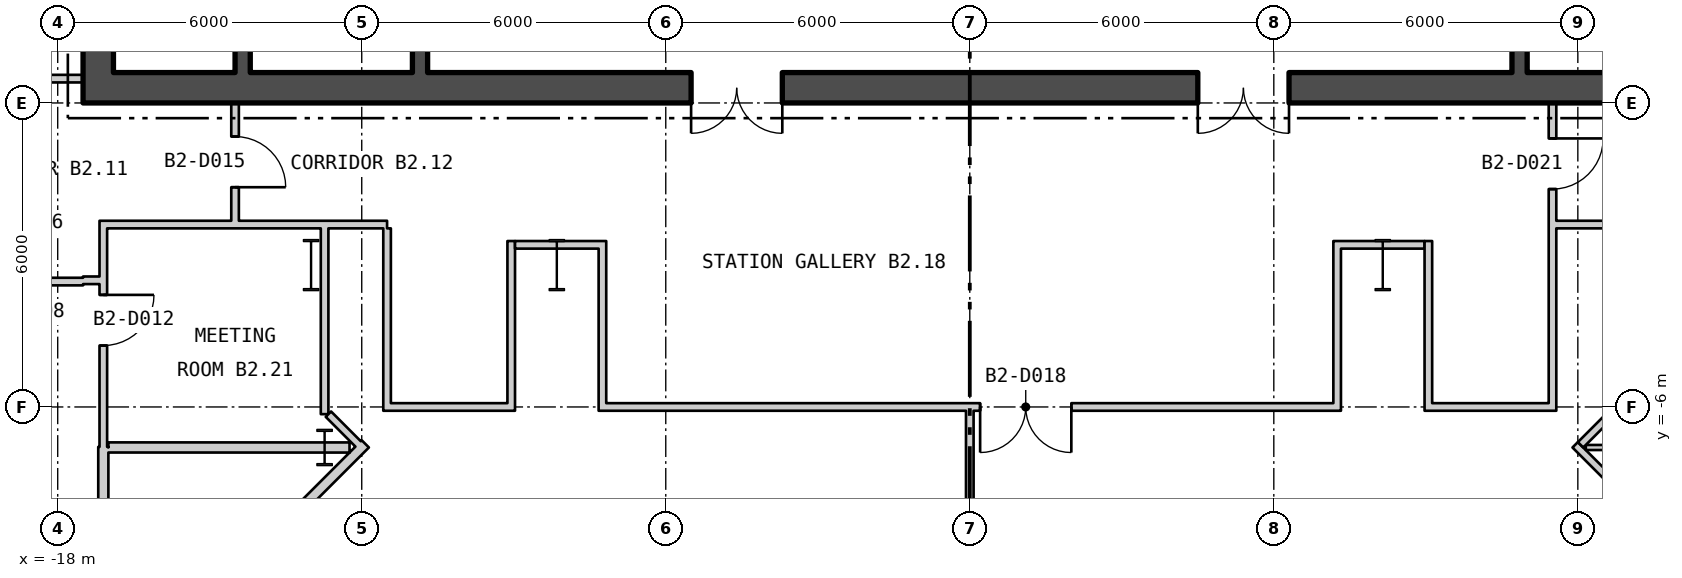
"""IFC4 building model, lengths in metres.
Left out: names, types, materials, properties, quantities, classifications, styles, units other than length and angle.
Written with IfcOpenShell. Run it as: python <this file> out.ifc"""

import sys

from ifc_helpers import new_model, si_unit, direction, frame, frame_2d, origin, origin_2d, place, context, subcontext, project, spatial, rectangle, i_section, extrude, element, fill, save


model = new_model("IFC4")
c1 = context("Model", 3, precision=1e-05, world=origin(), true_north=direction((0.0, 1.0)))
c2 = subcontext(c1, "Body", "Model", "MODEL_VIEW")
j1 = project(units=[si_unit("LENGTHUNIT", "METRE"), si_unit("PLANEANGLEUNIT", "RADIAN")], contexts=[c1])
p1 = place(None, origin())
s1 = spatial("IfcSite", under=j1, at=p1, CompositionType="ELEMENT")
p2 = place(p1, origin())
s2 = spatial("IfcBuilding", under=s1, at=p2, CompositionType="ELEMENT")
p3 = place(p2, frame((0.0, 0.0, -11.4)))
s3 = spatial("IfcBuildingStorey", under=s2, at=p3, CompositionType="ELEMENT", Elevation=-11.4)
for number, where, z_axis, x_axis in (
    (1, (8.15, -3.2, 0.0), (0.0, 0.0, 1.0), (1.0, 0.0, 0.0)),
    (2, (-8.15, -3.2, 0.0), (0.0, 0.0, 1.0), (1.0, 0.0, 0.0)),
    (3, (-13.0, -3.2, 0.0), (0.0, 0.0, 1.0), (1.0, 0.0, 0.0)),
):
    element("IfcColumn", number, at=place(p3, frame(where, z_axis=z_axis, x_axis=x_axis)), inside=s3, PredefinedType="COLUMN", context=c2, shape_type="SweptSolid", body=[
        extrude(i_section(OverallWidth=0.302, OverallDepth=1.008, WebThickness=0.021, FlangeThickness=0.04, at=origin_2d()), origin(), (0.0, 0.0, 1.0), 5.7),
    ])
p4 = place(p3, frame((-12.733, -6.8, 0.0), z_axis=(0.0, 0.0, 1.0), x_axis=(1.0, 0.0, 0.0)))
e4 = element("IfcColumn", 4, at=p4, inside=s3, PredefinedType="COLUMN", context=c2, shape_type="SweptSolid", body=[
    extrude(i_section(OverallWidth=0.304, OverallDepth=0.716, WebThickness=0.021, FlangeThickness=0.04, at=origin_2d()), origin(), (0.0, 0.0, 1.0), 5.7),
])
p5 = place(p3, frame((-17.5, 0.3, 0.0), z_axis=(0.0, 0.0, 1.0), x_axis=(1.0, 0.0, 0.0)))
e5 = element("IfcWall", 5, at=p5, inside=s3, PredefinedType="SHEAR", context=c2, shape_type="SweptSolid", body=[
    extrude(rectangle(XDim=35.0, YDim=0.6, at=frame_2d((17.5, 0.0))), origin(), (0.0, 0.0, 1.0), 5.25),
])
p6 = place(p5, frame((12.0, 0.0, 0.0)))
e6 = element("IfcOpeningElement", 6, at=p6, cuts=e5, PredefinedType="OPENING", context=c2, shape_type="SweptSolid", body=[
    extrude(rectangle(XDim=1.8, YDim=2.4, at=frame_2d((0.9, 1.2))), frame((0.0, 0.31, 0.0), z_axis=(0.0, -1.0, 0.0), x_axis=(1.0, 0.0, 0.0)), (0.0, 0.0, 1.0), 0.62),
])
p7 = place(p5, frame((22.0, 0.0, 0.0)))
e7 = element("IfcOpeningElement", 7, at=p7, cuts=e5, PredefinedType="OPENING", context=c2, shape_type="SweptSolid", body=[
    extrude(rectangle(XDim=1.8, YDim=2.4, at=frame_2d((0.9, 1.2))), frame((0.0, 0.31, 0.0), z_axis=(0.0, -1.0, 0.0), x_axis=(1.0, 0.0, 0.0)), (0.0, 0.0, 1.0), 0.62),
])
p8 = place(p3, frame((-17.2, 0.6, 0.0), z_axis=(0.0, 0.0, 1.0), x_axis=(0.0, 1.0, 0.0)))
e8 = element("IfcWall", 8, at=p8, inside=s3, PredefinedType="SHEAR", context=c2, shape_type="SweptSolid", body=[
    extrude(rectangle(XDim=16.8, YDim=0.6, at=frame_2d((8.4, 0.0))), origin(), (0.0, 0.0, 1.0), 5.25),
])
p9 = place(p8, frame((5.7, 0.0, 0.0)))
e9 = element("IfcOpeningElement", 9, at=p9, cuts=e8, PredefinedType="OPENING", context=c2, shape_type="SweptSolid", body=[
    extrude(rectangle(XDim=1.5, YDim=2.1, at=frame_2d((0.75, 1.05))), frame((0.0, 0.31, 0.0), z_axis=(0.0, -1.0, 0.0), x_axis=(1.0, 0.0, 0.0)), (0.0, 0.0, 1.0), 0.62),
])
p10 = place(p8, frame((1.5, 0.0, 0.0)))
e10 = element("IfcOpeningElement", 10, at=p10, cuts=e8, PredefinedType="OPENING", context=c2, shape_type="SweptSolid", body=[
    extrude(rectangle(XDim=0.9, YDim=2.1, at=frame_2d((0.45, 1.05))), frame((0.0, 0.31, 0.0), z_axis=(0.0, -1.0, 0.0), x_axis=(1.0, 0.0, 0.0)), (0.0, 0.0, 1.0), 0.62),
])
p11 = place(p8, frame((4.35, 0.0, 0.0)))
e11 = element("IfcOpeningElement", 11, at=p11, cuts=e8, PredefinedType="OPENING", context=c2, shape_type="SweptSolid", body=[
    extrude(rectangle(XDim=0.9, YDim=2.1, at=frame_2d((0.45, 1.05))), frame((0.0, 0.31, 0.0), z_axis=(0.0, -1.0, 0.0), x_axis=(1.0, 0.0, 0.0)), (0.0, 0.0, 1.0), 0.62),
])
p12 = place(p8, frame((8.423, 0.0, 0.0)))
e12 = element("IfcOpeningElement", 12, at=p12, cuts=e8, PredefinedType="OPENING", context=c2, shape_type="SweptSolid", body=[
    extrude(rectangle(XDim=1.0, YDim=2.1, at=frame_2d((0.5, 1.05))), frame((0.0, 0.31, 0.0), z_axis=(0.0, -1.0, 0.0), x_axis=(1.0, 0.0, 0.0)), (0.0, 0.0, 1.0), 0.62),
])
p13 = place(p8, frame((13.273, 0.0, 0.0)))
e13 = element("IfcOpeningElement", 13, at=p13, cuts=e8, PredefinedType="OPENING", context=c2, shape_type="SweptSolid", body=[
    extrude(rectangle(XDim=0.9, YDim=2.1, at=frame_2d((0.45, 1.05))), frame((0.0, 0.31, 0.0), z_axis=(0.0, -1.0, 0.0), x_axis=(1.0, 0.0, 0.0)), (0.0, 0.0, 1.0), 0.62),
])
p14 = place(p3, frame((-10.85, 0.6, 0.0), z_axis=(0.0, 0.0, 1.0), x_axis=(0.0, 1.0, 0.0)))
e14 = element("IfcWall", 14, at=p14, inside=s3, PredefinedType="SHEAR", context=c2, shape_type="SweptSolid", body=[
    extrude(rectangle(XDim=16.8, YDim=0.3, at=frame_2d((8.4, 0.0))), origin(), (0.0, 0.0, 1.0), 5.25),
])
p15 = place(p14, frame((5.075, 0.0, 0.0)))
e15 = element("IfcOpeningElement", 15, at=p15, cuts=e14, PredefinedType="OPENING", context=c2, shape_type="SweptSolid", body=[
    extrude(rectangle(XDim=1.25, YDim=2.1, at=frame_2d((0.625, 1.05))), frame((0.0, 0.16, 0.0), z_axis=(0.0, -1.0, 0.0), x_axis=(1.0, 0.0, 0.0)), (0.0, 0.0, 1.0), 0.32),
])
p16 = place(p14, frame((1.525, 0.0, 0.0)))
e16 = element("IfcOpeningElement", 16, at=p16, cuts=e14, PredefinedType="OPENING", context=c2, shape_type="SweptSolid", body=[
    extrude(rectangle(XDim=1.0, YDim=2.1, at=frame_2d((0.5, 1.05))), frame((0.0, 0.16, 0.0), z_axis=(0.0, -1.0, 0.0), x_axis=(1.0, 0.0, 0.0)), (0.0, 0.0, 1.0), 0.32),
])
p17 = place(p3, frame((-14.35, 0.6, 0.0), z_axis=(0.0, 0.0, 1.0), x_axis=(0.0, 1.0, 0.0)))
e17 = element("IfcWall", 17, at=p17, inside=s3, PredefinedType="SHEAR", context=c2, shape_type="SweptSolid", body=[
    extrude(rectangle(XDim=16.8, YDim=0.3, at=frame_2d((8.4, 0.0))), origin(), (0.0, 0.0, 1.0), 5.25),
])
p18 = place(p17, frame((5.7, 0.0, 0.0)))
e18 = element("IfcOpeningElement", 18, at=p18, cuts=e17, PredefinedType="OPENING", context=c2, shape_type="SweptSolid", body=[
    extrude(rectangle(XDim=1.5, YDim=2.1, at=frame_2d((0.75, 1.05))), frame((0.0, 0.16, 0.0), z_axis=(0.0, -1.0, 0.0), x_axis=(1.0, 0.0, 0.0)), (0.0, 0.0, 1.0), 0.32),
])
p19 = place(p3, frame((10.85, 0.6, 0.0), z_axis=(0.0, 0.0, 1.0), x_axis=(0.0, 1.0, 0.0)))
e19 = element("IfcWall", 19, at=p19, inside=s3, PredefinedType="SHEAR", context=c2, shape_type="SweptSolid", body=[
    extrude(rectangle(XDim=16.8, YDim=0.3, at=frame_2d((8.4, 0.0))), origin(), (0.0, 0.0, 1.0), 5.25),
])
p20 = place(p19, frame((5.075, 0.0, 0.0)))
e20 = element("IfcOpeningElement", 20, at=p20, cuts=e19, PredefinedType="OPENING", context=c2, shape_type="SweptSolid", body=[
    extrude(rectangle(XDim=1.25, YDim=2.1, at=frame_2d((0.625, 1.05))), frame((0.0, 0.16, 0.0), z_axis=(0.0, -1.0, 0.0), x_axis=(1.0, 0.0, 0.0)), (0.0, 0.0, 1.0), 0.32),
])
p21 = place(p19, frame((1.525, 0.0, 0.0)))
e21 = element("IfcOpeningElement", 21, at=p21, cuts=e19, PredefinedType="OPENING", context=c2, shape_type="SweptSolid", body=[
    extrude(rectangle(XDim=1.0, YDim=2.1, at=frame_2d((0.5, 1.05))), frame((0.0, 0.16, 0.0), z_axis=(0.0, -1.0, 0.0), x_axis=(1.0, 0.0, 0.0)), (0.0, 0.0, 1.0), 0.32),
])
p22 = place(p3, frame((-19.9, 0.48, 0.0), z_axis=(0.0, 0.0, 1.0), x_axis=(1.0, 0.0, 0.0)))
e22 = element("IfcWall", 22, at=p22, inside=s3, PredefinedType="PARTITIONING", context=c2, shape_type="SweptSolid", body=[
    extrude(rectangle(XDim=2.4, YDim=0.15, at=frame_2d((1.2, 0.0))), origin(), (0.0, 0.0, 1.0), 5.25),
])
p23 = place(p22, frame((0.7, 0.0, 0.0)))
e23 = element("IfcOpeningElement", 23, at=p23, cuts=e22, PredefinedType="OPENING", context=c2, shape_type="SweptSolid", body=[
    extrude(rectangle(XDim=1.0, YDim=2.1, at=frame_2d((0.5, 1.05))), frame((0.0, 0.085, 0.0), z_axis=(0.0, -1.0, 0.0), x_axis=(1.0, 0.0, 0.0)), (0.0, 0.0, 1.0), 0.17),
])
p24 = place(p3, frame((-19.825, -3.525, 0.0), z_axis=(0.0, 0.0, 1.0), x_axis=(1.0, 0.0, 0.0)))
e24 = element("IfcWall", 24, at=p24, inside=s3, PredefinedType="PARTITIONING", context=c2, shape_type="SweptSolid", body=[
    extrude(rectangle(XDim=2.325, YDim=0.15, at=frame_2d((1.163, 0.0))), origin(), (0.0, 0.0, 1.0), 5.25),
])
p25 = place(p24, frame((0.662, 0.0, 0.0)))
e25 = element("IfcOpeningElement", 25, at=p25, cuts=e24, PredefinedType="OPENING", context=c2, shape_type="SweptSolid", body=[
    extrude(rectangle(XDim=1.0, YDim=2.1, at=frame_2d((0.5, 1.05))), frame((0.0, 0.085, 0.0), z_axis=(0.0, -1.0, 0.0), x_axis=(1.0, 0.0, 0.0)), (0.0, 0.0, 1.0), 0.17),
])
p26 = place(p3, frame((-17.5, -3.5, 0.0), z_axis=(0.0, 0.0, 1.0), x_axis=(1.0, 0.0, 0.0)))
e26 = element("IfcWall", 26, at=p26, inside=s3, PredefinedType="PARTITIONING", context=c2, shape_type="SweptSolid", body=[
    extrude(rectangle(XDim=0.325, YDim=0.15, at=frame_2d((0.163, 0.0))), origin(), (0.0, 0.0, 1.0), 5.25),
])
p27 = place(p3, frame((-17.175, -2.4, 0.0), z_axis=(0.0, 0.0, 1.0), x_axis=(1.0, 0.0, 0.0)))
e27 = element("IfcWall", 27, at=p27, inside=s3, PredefinedType="PARTITIONING", context=c2, shape_type="SweptSolid", body=[
    extrude(rectangle(XDim=5.675, YDim=0.15, at=frame_2d((2.837, 0.0))), origin(), (0.0, 0.0, 1.0), 5.25),
])
p28 = place(p3, frame((-17.171, -11.971, 0.0), z_axis=(0.0, 0.0, 1.0), x_axis=(0.707106781187, 0.707106781187, 0.0)))
e28 = element("IfcWall", 28, at=p28, inside=s3, PredefinedType="PARTITIONING", context=c2, shape_type="SweptSolid", body=[
    extrude(rectangle(XDim=7.413, YDim=0.2, at=frame_2d((3.707, 0.0))), origin(), (0.0, 0.0, 1.0), 5.25),
])
p29 = place(p3, frame((-17.1, -11.659, 0.0), z_axis=(0.0, 0.0, 1.0), x_axis=(0.0, 1.0, 0.0)))
e29 = element("IfcWall", 29, at=p29, inside=s3, PredefinedType="PARTITIONING", context=c2, shape_type="SweptSolid", body=[
    extrude(rectangle(XDim=4.871, YDim=0.2, at=frame_2d((2.436, 0.0))), origin(), (0.0, 0.0, 1.0), 5.25),
])
p30 = place(p29, frame((1.804, 0.0, 0.0)))
e30 = element("IfcOpeningElement", 30, at=p30, cuts=e29, PredefinedType="OPENING", context=c2, shape_type="SweptSolid", body=[
    extrude(rectangle(XDim=1.1, YDim=2.1, at=frame_2d((0.55, 1.05))), frame((0.0, 0.11, 0.0), z_axis=(0.0, -1.0, 0.0), x_axis=(1.0, 0.0, 0.0)), (0.0, 0.0, 1.0), 0.22),
])
p31 = place(p3, frame((-17.1, -6.788, 0.0), z_axis=(0.0, 0.0, 1.0), x_axis=(0.0, 1.0, 0.0)))
e31 = element("IfcWall", 31, at=p31, inside=s3, PredefinedType="PARTITIONING", context=c2, shape_type="SweptSolid", body=[
    extrude(rectangle(XDim=4.313, YDim=0.15, at=frame_2d((2.156, 0.0))), origin(), (0.0, 0.0, 1.0), 5.25),
])
p32 = place(p31, frame((2.0, 0.0, 0.0)))
e32 = element("IfcOpeningElement", 32, at=p32, cuts=e31, PredefinedType="OPENING", context=c2, shape_type="SweptSolid", body=[
    extrude(rectangle(XDim=1.0, YDim=2.1, at=frame_2d((0.5, 1.05))), frame((0.0, 0.085, 0.0), z_axis=(0.0, -1.0, 0.0), x_axis=(1.0, 0.0, 0.0)), (0.0, 0.0, 1.0), 0.17),
])
p33 = place(p3, frame((-17.0, -6.799, 0.0), z_axis=(0.0, 0.0, 1.0), x_axis=(0.999999977923, -0.000210128174, 0.0)))
e33 = element("IfcWall", 33, at=p33, inside=s3, PredefinedType="PARTITIONING", context=c2, shape_type="SweptSolid", body=[
    extrude(rectangle(XDim=4.759, YDim=0.2, at=frame_2d((2.38, 0.0))), origin(), (0.0, 0.0, 1.0), 5.25),
])
p34 = place(p3, frame((-14.5, -2.325, 0.0), z_axis=(0.0, 0.0, 1.0), x_axis=(0.0, 1.0, 0.0)))
e34 = element("IfcWall", 34, at=p34, inside=s3, PredefinedType="PARTITIONING", context=c2, shape_type="SweptSolid", body=[
    extrude(rectangle(XDim=2.325, YDim=0.15, at=frame_2d((1.163, 0.0))), origin(), (0.0, 0.0, 1.0), 5.25),
])
p35 = place(p34, frame((0.662, 0.0, 0.0)))
e35 = element("IfcOpeningElement", 35, at=p35, cuts=e34, PredefinedType="OPENING", context=c2, shape_type="SweptSolid", body=[
    extrude(rectangle(XDim=1.0, YDim=2.1, at=frame_2d((0.5, 1.05))), frame((0.0, 0.085, 0.0), z_axis=(0.0, -1.0, 0.0), x_axis=(1.0, 0.0, 0.0)), (0.0, 0.0, 1.0), 0.17),
])
p36 = place(p3, frame((-12.733, -6.142, 0.0), z_axis=(0.0, 0.0, 1.0), x_axis=(0.0, 1.0, 0.0)))
e36 = element("IfcWall", 36, at=p36, inside=s3, PredefinedType="PARTITIONING", context=c2, shape_type="SweptSolid", body=[
    extrude(rectangle(XDim=3.667, YDim=0.15, at=frame_2d((1.833, 0.0))), origin(), (0.0, 0.0, 1.0), 5.25),
])
p37 = place(p3, frame((-12.658, -6.142, 0.0), z_axis=(0.0, 0.0, 1.0), x_axis=(0.706504732317, -0.707708317892, 0.0)))
e37 = element("IfcWall", 37, at=p37, inside=s3, PredefinedType="PARTITIONING", context=c2, shape_type="SweptSolid", body=[
    extrude(rectangle(XDim=0.831, YDim=0.15, at=frame_2d((0.415, 0.0))), origin(), (0.0, 0.0, 1.0), 5.25),
])
p38 = place(p3, frame((-11.5, -6.075, 0.0), z_axis=(0.0, 0.0, 1.0), x_axis=(0.0, 1.0, 0.0)))
e38 = element("IfcWall", 38, at=p38, inside=s3, PredefinedType="PARTITIONING", context=c2, shape_type="SweptSolid", body=[
    extrude(rectangle(XDim=3.6, YDim=0.15, at=frame_2d((1.8, 0.0))), origin(), (0.0, 0.0, 1.0), 5.25),
])
p39 = place(p3, frame((-11.425, -6.0, 0.0), z_axis=(0.0, 0.0, 1.0), x_axis=(1.0, 0.0, 0.0)))
e39 = element("IfcWall", 39, at=p39, inside=s3, PredefinedType="PARTITIONING", context=c2, shape_type="SweptSolid", body=[
    extrude(rectangle(XDim=2.3, YDim=0.15, at=frame_2d((1.15, 0.0))), origin(), (0.0, 0.0, 1.0), 5.25),
])
p40 = place(p3, frame((-9.05, -6.075, 0.0), z_axis=(0.0, 0.0, 1.0), x_axis=(0.0, 1.0, 0.0)))
e40 = element("IfcWall", 40, at=p40, inside=s3, PredefinedType="PARTITIONING", context=c2, shape_type="SweptSolid", body=[
    extrude(rectangle(XDim=3.35, YDim=0.15, at=frame_2d((1.675, 0.0))), origin(), (0.0, 0.0, 1.0), 5.25),
])
p41 = place(p3, frame((-8.975, -2.8, 0.0), z_axis=(0.0, 0.0, 1.0), x_axis=(1.0, 0.0, 0.0)))
e41 = element("IfcWall", 41, at=p41, inside=s3, PredefinedType="PARTITIONING", context=c2, shape_type="SweptSolid", body=[
    extrude(rectangle(XDim=1.65, YDim=0.15, at=frame_2d((0.825, 0.0))), origin(), (0.0, 0.0, 1.0), 5.25),
])
p42 = place(p3, frame((-7.325, -6.0, 0.0), z_axis=(0.0, 0.0, 1.0), x_axis=(1.0, 0.0, 0.0)))
e42 = element("IfcWall", 42, at=p42, inside=s3, PredefinedType="PARTITIONING", context=c2, shape_type="SweptSolid", body=[
    extrude(rectangle(XDim=14.65, YDim=0.15, at=frame_2d((7.325, 0.0))), origin(), (0.0, 0.0, 1.0), 5.25),
])
p43 = place(p42, frame((7.529, 0.0, 0.0)))
e43 = element("IfcOpeningElement", 43, at=p43, cuts=e42, PredefinedType="OPENING", context=c2, shape_type="SweptSolid", body=[
    extrude(rectangle(XDim=1.8, YDim=2.1, at=frame_2d((0.9, 1.05))), frame((0.0, 0.085, 0.0), z_axis=(0.0, -1.0, 0.0), x_axis=(1.0, 0.0, 0.0)), (0.0, 0.0, 1.0), 0.17),
])
p44 = place(p3, frame((-7.25, -5.925, 0.0), z_axis=(0.0, 0.0, 1.0), x_axis=(0.0, 1.0, 0.0)))
e44 = element("IfcWall", 44, at=p44, inside=s3, PredefinedType="PARTITIONING", context=c2, shape_type="SweptSolid", body=[
    extrude(rectangle(XDim=3.2, YDim=0.15, at=frame_2d((1.6, 0.0))), origin(), (0.0, 0.0, 1.0), 5.25),
])
p45 = place(p3, frame((0.0, -13.45, 0.0), z_axis=(0.0, 0.0, 1.0), x_axis=(0.0, 1.0, 0.0)))
e45 = element("IfcWall", 45, at=p45, inside=s3, PredefinedType="PARTITIONING", context=c2, shape_type="SweptSolid", body=[
    extrude(rectangle(XDim=7.375, YDim=0.15, at=frame_2d((3.688, 0.0))), origin(), (0.0, 0.0, 1.0), 5.25),
])
p46 = place(p3, frame((7.25, -5.925, 0.0), z_axis=(0.0, 0.0, 1.0), x_axis=(0.0, 1.0, 0.0)))
e46 = element("IfcWall", 46, at=p46, inside=s3, PredefinedType="PARTITIONING", context=c2, shape_type="SweptSolid", body=[
    extrude(rectangle(XDim=3.2, YDim=0.15, at=frame_2d((1.6, 0.0))), origin(), (0.0, 0.0, 1.0), 5.25),
])
p47 = place(p3, frame((7.325, -2.8, 0.0), z_axis=(0.0, 0.0, 1.0), x_axis=(1.0, 0.0, 0.0)))
e47 = element("IfcWall", 47, at=p47, inside=s3, PredefinedType="PARTITIONING", context=c2, shape_type="SweptSolid", body=[
    extrude(rectangle(XDim=1.65, YDim=0.15, at=frame_2d((0.825, 0.0))), origin(), (0.0, 0.0, 1.0), 5.25),
])
p48 = place(p3, frame((9.05, -6.075, 0.0), z_axis=(0.0, 0.0, 1.0), x_axis=(0.0, 1.0, 0.0)))
e48 = element("IfcWall", 48, at=p48, inside=s3, PredefinedType="PARTITIONING", context=c2, shape_type="SweptSolid", body=[
    extrude(rectangle(XDim=3.35, YDim=0.15, at=frame_2d((1.675, 0.0))), origin(), (0.0, 0.0, 1.0), 5.25),
])
p49 = place(p3, frame((9.125, -6.0, 0.0), z_axis=(0.0, 0.0, 1.0), x_axis=(1.0, 0.0, 0.0)))
e49 = element("IfcWall", 49, at=p49, inside=s3, PredefinedType="PARTITIONING", context=c2, shape_type="SweptSolid", body=[
    extrude(rectangle(XDim=2.3, YDim=0.15, at=frame_2d((1.15, 0.0))), origin(), (0.0, 0.0, 1.0), 5.25),
])
p50 = place(p3, frame((11.5, -6.075, 0.0), z_axis=(0.0, 0.0, 1.0), x_axis=(0.0, 1.0, 0.0)))
e50 = element("IfcWall", 50, at=p50, inside=s3, PredefinedType="PARTITIONING", context=c2, shape_type="SweptSolid", body=[
    extrude(rectangle(XDim=6.075, YDim=0.15, at=frame_2d((3.038, 0.0))), origin(), (0.0, 0.0, 1.0), 5.25),
])
p51 = place(p50, frame((4.375, 0.0, 0.0)))
e51 = element("IfcOpeningElement", 51, at=p51, cuts=e50, PredefinedType="OPENING", context=c2, shape_type="SweptSolid", body=[
    extrude(rectangle(XDim=1.0, YDim=2.1, at=frame_2d((0.5, 1.05))), frame((0.0, 0.085, 0.0), z_axis=(0.0, -1.0, 0.0), x_axis=(1.0, 0.0, 0.0)), (0.0, 0.0, 1.0), 0.17),
])
p52 = place(p3, frame((11.575, -2.4, 0.0), z_axis=(0.0, 0.0, 1.0), x_axis=(1.0, 0.0, 0.0)))
e52 = element("IfcWall", 52, at=p52, inside=s3, PredefinedType="PARTITIONING", context=c2, shape_type="SweptSolid", body=[
    extrude(rectangle(XDim=5.45, YDim=0.15, at=frame_2d((2.725, 0.0))), origin(), (0.0, 0.0, 1.0), 5.25),
])
p53 = place(p3, frame((11.947, -6.747, 0.0), z_axis=(0.0, 0.0, 1.0), x_axis=(0.707106781187, -0.707106781187, 0.0)))
e53 = element("IfcWall", 53, at=p53, inside=s3, PredefinedType="PARTITIONING", context=c2, shape_type="SweptSolid", body=[
    extrude(rectangle(XDim=7.106, YDim=0.15, at=frame_2d((3.553, 0.0))), origin(), (0.0, 0.0, 1.0), 5.25),
])
p54 = place(p3, frame((12.054, -6.747, 0.0), z_axis=(0.0, 0.0, 1.0), x_axis=(0.706521670373, 0.707691408238, 0.0)))
e54 = element("IfcWall", 54, at=p54, inside=s3, PredefinedType="PARTITIONING", context=c2, shape_type="SweptSolid", body=[
    extrude(rectangle(XDim=0.855, YDim=0.15, at=frame_2d((0.427, 0.0))), origin(), (0.0, 0.0, 1.0), 5.25),
])
p55 = place(p3, frame((12.157, -6.8, 0.0), z_axis=(0.0, 0.0, 1.0), x_axis=(1.0, 0.0, 0.0)))
e55 = element("IfcWall", 55, at=p55, inside=s3, PredefinedType="PARTITIONING", context=c2, shape_type="SweptSolid", body=[
    extrude(rectangle(XDim=4.868, YDim=0.1, at=frame_2d((2.434, 0.0))), origin(), (0.0, 0.0, 1.0), 5.25),
])
p56 = place(p6, origin())
e56 = element("IfcDoor", 56, at=p56, inside=s3, OperationType="DOUBLE_DOOR_SINGLE_SWING", PredefinedType="DOOR", context=c2, shape_type="SweptSolid", body=[
    extrude(rectangle(XDim=1.8, YDim=2.4, at=frame_2d((0.9, 1.2))), frame((0.0, 0.025, 0.0), z_axis=(0.0, -1.0, 0.0), x_axis=(1.0, 0.0, 0.0)), (0.0, 0.0, 1.0), 0.05),
])
fill(e6, e56)
p57 = place(p7, origin())
e57 = element("IfcDoor", 57, at=p57, inside=s3, OperationType="DOUBLE_DOOR_SINGLE_SWING", PredefinedType="DOOR", context=c2, shape_type="SweptSolid", body=[
    extrude(rectangle(XDim=1.8, YDim=2.4, at=frame_2d((0.9, 1.2))), frame((0.0, 0.025, 0.0), z_axis=(0.0, -1.0, 0.0), x_axis=(1.0, 0.0, 0.0)), (0.0, 0.0, 1.0), 0.05),
])
fill(e7, e57)
p58 = place(p32, origin())
e58 = element("IfcDoor", 58, at=p58, inside=s3, OperationType="SINGLE_SWING_RIGHT", PredefinedType="DOOR", context=c2, shape_type="SweptSolid", body=[
    extrude(rectangle(XDim=1.0, YDim=2.1, at=frame_2d((0.5, 1.05))), frame((0.0, 0.025, 0.0), z_axis=(0.0, -1.0, 0.0), x_axis=(1.0, 0.0, 0.0)), (0.0, 0.0, 1.0), 0.05),
])
fill(e32, e58)
p59 = place(p35, origin())
e59 = element("IfcDoor", 59, at=p59, inside=s3, OperationType="SINGLE_SWING_LEFT", PredefinedType="DOOR", context=c2, shape_type="SweptSolid", body=[
    extrude(rectangle(XDim=1.0, YDim=2.1, at=frame_2d((0.5, 1.05))), frame((0.0, 0.025, 0.0), z_axis=(0.0, -1.0, 0.0), x_axis=(1.0, 0.0, 0.0)), (0.0, 0.0, 1.0), 0.05),
])
fill(e35, e59)
p60 = place(p43, origin())
e60 = element("IfcDoor", 60, at=p60, inside=s3, OperationType="DOUBLE_DOOR_SINGLE_SWING", PredefinedType="DOOR", context=c2, shape_type="SweptSolid", body=[
    extrude(rectangle(XDim=1.8, YDim=2.1, at=frame_2d((0.9, 1.05))), frame((0.0, 0.025, 0.0), z_axis=(0.0, -1.0, 0.0), x_axis=(1.0, 0.0, 0.0)), (0.0, 0.0, 1.0), 0.05),
])
fill(e43, e60)
p61 = place(p51, origin())
e61 = element("IfcDoor", 61, at=p61, inside=s3, OperationType="SINGLE_SWING_RIGHT", PredefinedType="DOOR", context=c2, shape_type="SweptSolid", body=[
    extrude(rectangle(XDim=1.0, YDim=2.1, at=frame_2d((0.5, 1.05))), frame((0.0, 0.025, 0.0), z_axis=(0.0, -1.0, 0.0), x_axis=(1.0, 0.0, 0.0)), (0.0, 0.0, 1.0), 0.05),
])
fill(e51, e61)
save(model, sys.argv[1])
